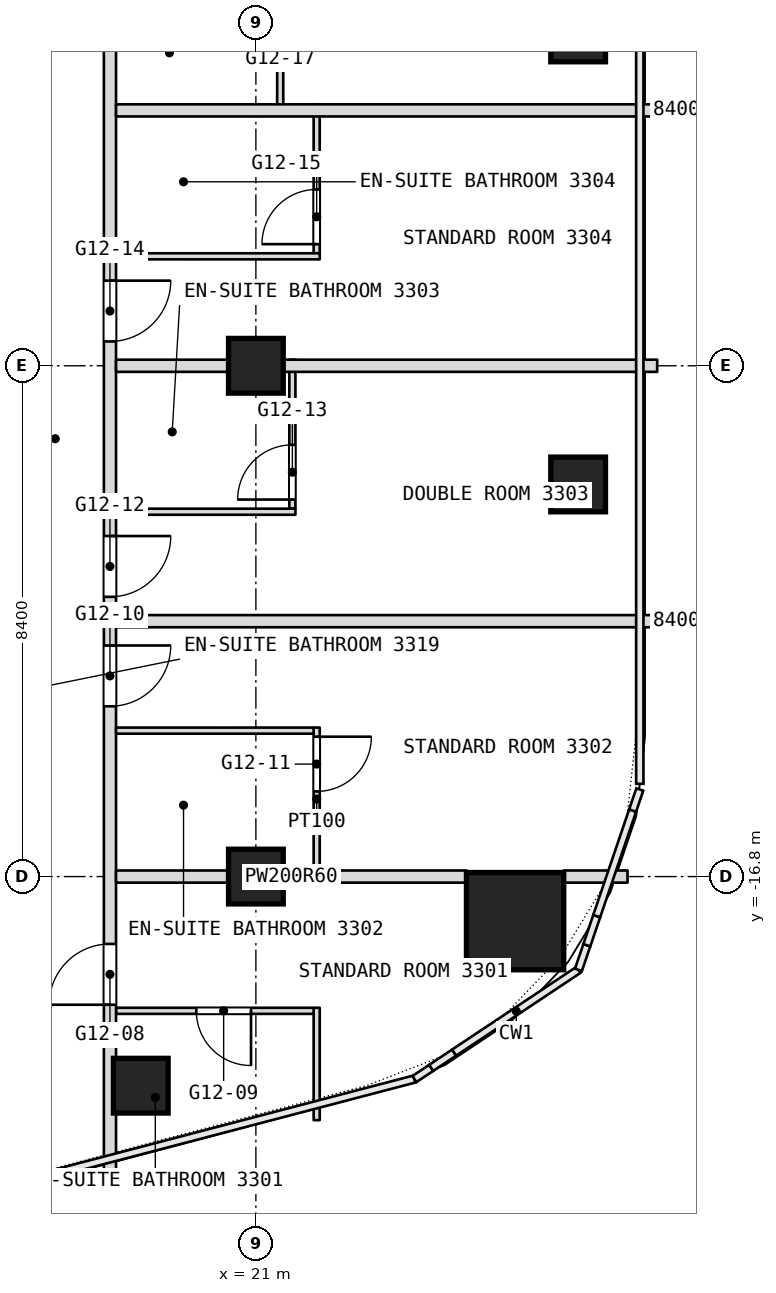
"""IFC4 building model, lengths in metres.
Left out: names, types, materials, properties, quantities, classifications, styles, units other than length and angle.
Written with IfcOpenShell. Run it as: python <this file> out.ifc"""

import sys

from ifc_helpers import new_model, si_unit, direction, frame, frame_2d, origin, origin_2d, place, context, subcontext, project, spatial, rectangle, extrude, element, fill, save


model = new_model("IFC4")
c1 = context("Model", 3, precision=1e-05, world=origin(), true_north=direction((0.0, 1.0)))
c2 = subcontext(c1, "Body", "Model", "MODEL_VIEW")
j1 = project(units=[si_unit("LENGTHUNIT", "METRE"), si_unit("PLANEANGLEUNIT", "RADIAN")], contexts=[c1])
p1 = place(None, origin())
s1 = spatial("IfcSite", under=j1, at=p1, CompositionType="ELEMENT")
p2 = place(p1, origin())
s2 = spatial("IfcBuilding", under=s1, at=p2, CompositionType="ELEMENT")
p3 = place(p2, frame((0.0, 0.0, 144.5)))
s3 = spatial("IfcBuildingStorey", under=s2, at=p3, CompositionType="ELEMENT", Elevation=144.5)
p4 = place(p3, frame((25.263, -17.533, 0.0), z_axis=(0.0, 0.0, 1.0), x_axis=(1.0, 0.0, 0.0)))
e1 = element("IfcColumn", 1, at=p4, inside=s3, PredefinedType="COLUMN", context=c2, shape_type="SweptSolid", body=[
    extrude(rectangle(XDim=1.6, YDim=1.6, at=origin_2d()), origin(), (0.0, 0.0, 1.0), 3.6),
])
for number, where, z_axis, x_axis in (
    (2, (21.0, -16.8, 0.0), (0.0, 0.0, 1.0), (1.0, 0.0, 0.0)),
    (3, (21.0, -8.4, 0.0), (0.0, 0.0, 1.0), (1.0, 0.0, 0.0)),
    (4, (26.3, -2.951, 0.0), (0.0, 0.0, 1.0), (1.0, 0.0, 0.0)),
    (5, (26.3, -10.352, 0.0), (0.0, 0.0, 1.0), (1.0, 0.0, 0.0)),
    (6, (19.107, -20.239, 0.0), (0.0, 0.0, 1.0), (1.0, 0.0, 0.0)),
):
    element("IfcColumn", number, at=place(p3, frame(where, z_axis=z_axis, x_axis=x_axis)), inside=s3, PredefinedType="COLUMN", context=c2, shape_type="SweptSolid", body=[
        extrude(rectangle(XDim=0.9, YDim=0.9, at=origin_2d()), origin(), (0.0, 0.0, 1.0), 3.6),
    ])
p5 = place(p3, frame((22.0, -20.806, 0.0), z_axis=(0.0, 0.0, 1.0), x_axis=(0.0, 1.0, 0.0)))
e7 = element("IfcWall", 7, at=p5, inside=s3, PredefinedType="PARTITIONING", context=c2, shape_type="SweptSolid", body=[
    extrude(rectangle(XDim=1.848, YDim=0.1, at=frame_2d((0.924, 0.0))), origin(), (0.0, 0.0, 1.0), 3.34),
])
p6 = place(p3, frame((22.0, -16.7, 0.0), z_axis=(0.0, 0.0, 1.0), x_axis=(0.0, 1.0, 0.0)))
e8 = element("IfcWall", 8, at=p6, inside=s3, PredefinedType="PARTITIONING", context=c2, shape_type="SweptSolid", body=[
    extrude(rectangle(XDim=2.35, YDim=0.1, at=frame_2d((1.175, 0.0))), origin(), (0.0, 0.0, 1.0), 3.34),
])
p7 = place(p6, frame((1.3, 0.0, 0.0)))
e9 = element("IfcOpeningElement", 9, at=p7, cuts=e8, PredefinedType="OPENING", context=c2, shape_type="SweptSolid", body=[
    extrude(rectangle(XDim=0.9, YDim=2.1, at=frame_2d((0.45, 1.05))), frame((0.0, 0.05, 0.0), z_axis=(0.0, -1.0, 0.0), x_axis=(1.0, 0.0, 0.0)), (0.0, 0.0, 1.0), 0.1),
])
p8 = place(p3, frame((22.0, -6.55, 0.0), z_axis=(0.0, 0.0, 1.0), x_axis=(0.0, 1.0, 0.0)))
e10 = element("IfcWall", 10, at=p8, inside=s3, PredefinedType="PARTITIONING", context=c2, shape_type="SweptSolid", body=[
    extrude(rectangle(XDim=2.45, YDim=0.1, at=frame_2d((1.225, 0.0))), origin(), (0.0, 0.0, 1.0), 3.34),
])
p9 = place(p8, frame((0.15, 0.0, 0.0)))
e11 = element("IfcOpeningElement", 11, at=p9, cuts=e10, PredefinedType="OPENING", context=c2, shape_type="SweptSolid", body=[
    extrude(rectangle(XDim=0.9, YDim=2.1, at=frame_2d((0.45, 1.05))), frame((0.0, 0.05, 0.0), z_axis=(0.0, -1.0, 0.0), x_axis=(1.0, 0.0, 0.0)), (0.0, 0.0, 1.0), 0.1),
])
p10 = place(p3, frame((21.6, -10.75, 0.0), z_axis=(0.0, 0.0, 1.0), x_axis=(0.0, 1.0, 0.0)))
e12 = element("IfcWall", 12, at=p10, inside=s3, PredefinedType="PARTITIONING", context=c2, shape_type="SweptSolid", body=[
    extrude(rectangle(XDim=2.45, YDim=0.1, at=frame_2d((1.225, 0.0))), origin(), (0.0, 0.0, 1.0), 3.34),
])
p11 = place(p10, frame((0.15, 0.0, 0.0)))
e13 = element("IfcOpeningElement", 13, at=p11, cuts=e12, PredefinedType="OPENING", context=c2, shape_type="SweptSolid", body=[
    extrude(rectangle(XDim=0.9, YDim=2.1, at=frame_2d((0.45, 1.05))), frame((0.0, 0.05, 0.0), z_axis=(0.0, -1.0, 0.0), x_axis=(1.0, 0.0, 0.0)), (0.0, 0.0, 1.0), 0.1),
])
p12 = place(p3, frame((21.4, -4.1, 0.0), z_axis=(0.0, 0.0, 1.0), x_axis=(0.0, 1.0, 0.0)))
e14 = element("IfcWall", 14, at=p12, inside=s3, PredefinedType="PARTITIONING", context=c2, shape_type="SweptSolid", body=[
    extrude(rectangle(XDim=2.35, YDim=0.1, at=frame_2d((1.175, 0.0))), origin(), (0.0, 0.0, 1.0), 3.34),
])
p13 = place(p12, frame((1.3, 0.0, 0.0)))
e15 = element("IfcOpeningElement", 15, at=p13, cuts=e14, PredefinedType="OPENING", context=c2, shape_type="SweptSolid", body=[
    extrude(rectangle(XDim=0.9, YDim=2.1, at=frame_2d((0.45, 1.05))), frame((0.0, 0.05, 0.0), z_axis=(0.0, -1.0, 0.0), x_axis=(1.0, 0.0, 0.0)), (0.0, 0.0, 1.0), 0.1),
])
p14 = place(p3, frame((18.7, -19.008, 0.0), z_axis=(0.0, 0.0, 1.0), x_axis=(1.0, 0.0, 0.0)))
e16 = element("IfcWall", 16, at=p14, inside=s3, PredefinedType="PARTITIONING", context=c2, shape_type="SweptSolid", body=[
    extrude(rectangle(XDim=3.25, YDim=0.1, at=frame_2d((1.625, 0.0))), origin(), (0.0, 0.0, 1.0), 3.34),
])
p15 = place(p14, frame((1.32, 0.0, 0.0)))
e17 = element("IfcOpeningElement", 17, at=p15, cuts=e16, PredefinedType="OPENING", context=c2, shape_type="SweptSolid", body=[
    extrude(rectangle(XDim=0.9, YDim=2.1, at=frame_2d((0.45, 1.05))), frame((0.0, 0.05, 0.0), z_axis=(0.0, -1.0, 0.0), x_axis=(1.0, 0.0, 0.0)), (0.0, 0.0, 1.0), 0.1),
])
p16 = place(p3, frame((18.6, -21.708, 0.0), z_axis=(0.0, 0.0, 1.0), x_axis=(0.0, 1.0, 0.0)))
e18 = element("IfcWall", 18, at=p16, inside=s3, PredefinedType="PARTITIONING", context=c2, shape_type="SweptSolid", body=[
    extrude(rectangle(XDim=49.648, YDim=0.2, at=frame_2d((24.824, 0.0))), origin(), (0.0, 0.0, 1.0), 3.34),
])
p17 = place(p16, frame((2.8, 0.0, 0.0)))
e19 = element("IfcOpeningElement", 19, at=p17, cuts=e18, PredefinedType="OPENING", context=c2, shape_type="SweptSolid", body=[
    extrude(rectangle(XDim=1.0, YDim=2.1, at=frame_2d((0.5, 1.05))), frame((0.0, 0.1, 0.0), z_axis=(0.0, -1.0, 0.0), x_axis=(1.0, 0.0, 0.0)), (0.0, 0.0, 1.0), 0.2),
])
p18 = place(p16, frame((7.708, 0.0, 0.0)))
e20 = element("IfcOpeningElement", 20, at=p18, cuts=e18, PredefinedType="OPENING", context=c2, shape_type="SweptSolid", body=[
    extrude(rectangle(XDim=1.0, YDim=2.1, at=frame_2d((0.5, 1.05))), frame((0.0, 0.1, 0.0), z_axis=(0.0, -1.0, 0.0), x_axis=(1.0, 0.0, 0.0)), (0.0, 0.0, 1.0), 0.2),
])
p19 = place(p16, frame((9.508, 0.0, 0.0)))
e21 = element("IfcOpeningElement", 21, at=p19, cuts=e18, PredefinedType="OPENING", context=c2, shape_type="SweptSolid", body=[
    extrude(rectangle(XDim=1.0, YDim=2.1, at=frame_2d((0.5, 1.05))), frame((0.0, 0.1, 0.0), z_axis=(0.0, -1.0, 0.0), x_axis=(1.0, 0.0, 0.0)), (0.0, 0.0, 1.0), 0.2),
])
p20 = place(p16, frame((13.708, 0.0, 0.0)))
e22 = element("IfcOpeningElement", 22, at=p20, cuts=e18, PredefinedType="OPENING", context=c2, shape_type="SweptSolid", body=[
    extrude(rectangle(XDim=1.0, YDim=2.1, at=frame_2d((0.5, 1.05))), frame((0.0, 0.1, 0.0), z_axis=(0.0, -1.0, 0.0), x_axis=(1.0, 0.0, 0.0)), (0.0, 0.0, 1.0), 0.2),
])
p21 = place(p16, frame((20.308, 0.0, 0.0)))
e23 = element("IfcOpeningElement", 23, at=p21, cuts=e18, PredefinedType="OPENING", context=c2, shape_type="SweptSolid", body=[
    extrude(rectangle(XDim=1.0, YDim=2.1, at=frame_2d((0.5, 1.05))), frame((0.0, 0.1, 0.0), z_axis=(0.0, -1.0, 0.0), x_axis=(1.0, 0.0, 0.0)), (0.0, 0.0, 1.0), 0.2),
])
p22 = place(p16, frame((24.508, 0.0, 0.0)))
e24 = element("IfcOpeningElement", 24, at=p22, cuts=e18, PredefinedType="OPENING", context=c2, shape_type="SweptSolid", body=[
    extrude(rectangle(XDim=1.0, YDim=2.1, at=frame_2d((0.5, 1.05))), frame((0.0, 0.1, 0.0), z_axis=(0.0, -1.0, 0.0), x_axis=(1.0, 0.0, 0.0)), (0.0, 0.0, 1.0), 0.2),
])
p23 = place(p16, frame((26.308, 0.0, 0.0)))
e25 = element("IfcOpeningElement", 25, at=p23, cuts=e18, PredefinedType="OPENING", context=c2, shape_type="SweptSolid", body=[
    extrude(rectangle(XDim=1.0, YDim=2.1, at=frame_2d((0.5, 1.05))), frame((0.0, 0.1, 0.0), z_axis=(0.0, -1.0, 0.0), x_axis=(1.0, 0.0, 0.0)), (0.0, 0.0, 1.0), 0.2),
])
p24 = place(p16, frame((30.508, 0.0, 0.0)))
e26 = element("IfcOpeningElement", 26, at=p24, cuts=e18, PredefinedType="OPENING", context=c2, shape_type="SweptSolid", body=[
    extrude(rectangle(XDim=1.0, YDim=2.1, at=frame_2d((0.5, 1.05))), frame((0.0, 0.1, 0.0), z_axis=(0.0, -1.0, 0.0), x_axis=(1.0, 0.0, 0.0)), (0.0, 0.0, 1.0), 0.2),
])
p25 = place(p16, frame((37.108, 0.0, 0.0)))
e27 = element("IfcOpeningElement", 27, at=p25, cuts=e18, PredefinedType="OPENING", context=c2, shape_type="SweptSolid", body=[
    extrude(rectangle(XDim=1.0, YDim=2.1, at=frame_2d((0.5, 1.05))), frame((0.0, 0.1, 0.0), z_axis=(0.0, -1.0, 0.0), x_axis=(1.0, 0.0, 0.0)), (0.0, 0.0, 1.0), 0.2),
])
p26 = place(p16, frame((43.558, 0.0, 0.0)))
e28 = element("IfcOpeningElement", 28, at=p26, cuts=e18, PredefinedType="OPENING", context=c2, shape_type="SweptSolid", body=[
    extrude(rectangle(XDim=1.1, YDim=2.1, at=frame_2d((0.55, 1.05))), frame((0.0, 0.1, 0.0), z_axis=(0.0, -1.0, 0.0), x_axis=(1.0, 0.0, 0.0)), (0.0, 0.0, 1.0), 0.2),
])
p27 = place(p3, frame((18.7, -16.8, 0.0), z_axis=(0.0, 0.0, 1.0), x_axis=(1.0, 0.0, 0.0)))
e29 = element("IfcWall", 29, at=p27, inside=s3, PredefinedType="PARTITIONING", context=c2, shape_type="SweptSolid", body=[
    extrude(rectangle(XDim=5.763, YDim=0.2, at=frame_2d((2.881, 0.0))), origin(), (0.0, 0.0, 1.0), 2.89),
])
p28 = place(p3, frame((26.063, -16.8, 0.0), z_axis=(0.0, 0.0, 1.0), x_axis=(1.0, 0.0, 0.0)))
e30 = element("IfcWall", 30, at=p28, inside=s3, PredefinedType="PARTITIONING", context=c2, shape_type="SweptSolid", body=[
    extrude(rectangle(XDim=1.049, YDim=0.2, at=frame_2d((0.524, 0.0))), origin(), (0.0, 0.0, 1.0), 3.34),
])
p29 = place(p3, frame((18.7, -14.4, 0.0), z_axis=(0.0, 0.0, 1.0), x_axis=(1.0, 0.0, 0.0)))
e31 = element("IfcWall", 31, at=p29, inside=s3, PredefinedType="PARTITIONING", context=c2, shape_type="SweptSolid", body=[
    extrude(rectangle(XDim=3.25, YDim=0.1, at=frame_2d((1.625, 0.0))), origin(), (0.0, 0.0, 1.0), 3.34),
])
p30 = place(p3, frame((18.7, -12.6, 0.0), z_axis=(0.0, 0.0, 1.0), x_axis=(1.0, 0.0, 0.0)))
e32 = element("IfcWall", 32, at=p30, inside=s3, PredefinedType="PARTITIONING", context=c2, shape_type="SweptSolid", body=[
    extrude(rectangle(XDim=8.9, YDim=0.2, at=frame_2d((4.45, 0.0))), origin(), (0.0, 0.0, 1.0), 3.34),
])
p31 = place(p3, frame((18.7, -10.8, 0.0), z_axis=(0.0, 0.0, 1.0), x_axis=(1.0, 0.0, 0.0)))
e33 = element("IfcWall", 33, at=p31, inside=s3, PredefinedType="PARTITIONING", context=c2, shape_type="SweptSolid", body=[
    extrude(rectangle(XDim=2.95, YDim=0.1, at=frame_2d((1.475, 0.0))), origin(), (0.0, 0.0, 1.0), 3.34),
])
p32 = place(p3, frame((18.7, -8.4, 0.0), z_axis=(0.0, 0.0, 1.0), x_axis=(1.0, 0.0, 0.0)))
e34 = element("IfcWall", 34, at=p32, inside=s3, PredefinedType="PARTITIONING", context=c2, shape_type="SweptSolid", body=[
    extrude(rectangle(XDim=8.9, YDim=0.2, at=frame_2d((4.45, 0.0))), origin(), (0.0, 0.0, 1.0), 2.89),
])
p33 = place(p3, frame((18.7, -6.6, 0.0), z_axis=(0.0, 0.0, 1.0), x_axis=(1.0, 0.0, 0.0)))
e35 = element("IfcWall", 35, at=p33, inside=s3, PredefinedType="PARTITIONING", context=c2, shape_type="SweptSolid", body=[
    extrude(rectangle(XDim=3.35, YDim=0.1, at=frame_2d((1.675, 0.0))), origin(), (0.0, 0.0, 1.0), 3.34),
])
p34 = place(p3, frame((18.7, -4.2, 0.0), z_axis=(0.0, 0.0, 1.0), x_axis=(1.0, 0.0, 0.0)))
e36 = element("IfcWall", 36, at=p34, inside=s3, PredefinedType="PARTITIONING", context=c2, shape_type="SweptSolid", body=[
    extrude(rectangle(XDim=8.9, YDim=0.2, at=frame_2d((4.45, 0.0))), origin(), (0.0, 0.0, 1.0), 3.34),
])
p35 = place(p7, origin())
e37 = element("IfcDoor", 37, at=p35, inside=s3, OperationType="SINGLE_SWING_RIGHT", PredefinedType="DOOR", context=c2, shape_type="SweptSolid", body=[
    extrude(rectangle(XDim=0.9, YDim=2.1, at=frame_2d((0.45, 1.05))), frame((0.0, 0.025, 0.0), z_axis=(0.0, -1.0, 0.0), x_axis=(1.0, 0.0, 0.0)), (0.0, 0.0, 1.0), 0.05),
])
fill(e9, e37)
p36 = place(p9, origin())
e38 = element("IfcDoor", 38, at=p36, inside=s3, OperationType="SINGLE_SWING_LEFT", PredefinedType="DOOR", context=c2, shape_type="SweptSolid", body=[
    extrude(rectangle(XDim=0.9, YDim=2.1, at=frame_2d((0.45, 1.05))), frame((0.0, 0.025, 0.0), z_axis=(0.0, -1.0, 0.0), x_axis=(1.0, 0.0, 0.0)), (0.0, 0.0, 1.0), 0.05),
])
fill(e11, e38)
p37 = place(p11, origin())
e39 = element("IfcDoor", 39, at=p37, inside=s3, OperationType="SINGLE_SWING_LEFT", PredefinedType="DOOR", context=c2, shape_type="SweptSolid", body=[
    extrude(rectangle(XDim=0.9, YDim=2.1, at=frame_2d((0.45, 1.05))), frame((0.0, 0.025, 0.0), z_axis=(0.0, -1.0, 0.0), x_axis=(1.0, 0.0, 0.0)), (0.0, 0.0, 1.0), 0.05),
])
fill(e13, e39)
p38 = place(p15, origin())
e40 = element("IfcDoor", 40, at=p38, inside=s3, OperationType="SINGLE_SWING_RIGHT", PredefinedType="DOOR", context=c2, shape_type="SweptSolid", body=[
    extrude(rectangle(XDim=0.9, YDim=2.1, at=frame_2d((0.45, 1.05))), frame((0.0, 0.025, 0.0), z_axis=(0.0, -1.0, 0.0), x_axis=(1.0, 0.0, 0.0)), (0.0, 0.0, 1.0), 0.05),
])
fill(e17, e40)
p39 = place(p17, origin())
e41 = element("IfcDoor", 41, at=p39, inside=s3, OperationType="SINGLE_SWING_RIGHT", PredefinedType="DOOR", context=c2, shape_type="SweptSolid", body=[
    extrude(rectangle(XDim=1.0, YDim=2.1, at=frame_2d((0.5, 1.05))), frame((0.0, 0.025, 0.0), z_axis=(0.0, -1.0, 0.0), x_axis=(1.0, 0.0, 0.0)), (0.0, 0.0, 1.0), 0.05),
])
fill(e19, e41)
p40 = place(p18, origin())
e42 = element("IfcDoor", 42, at=p40, inside=s3, OperationType="SINGLE_SWING_RIGHT", PredefinedType="DOOR", context=c2, shape_type="SweptSolid", body=[
    extrude(rectangle(XDim=1.0, YDim=2.1, at=frame_2d((0.5, 1.05))), frame((0.0, 0.025, 0.0), z_axis=(0.0, -1.0, 0.0), x_axis=(1.0, 0.0, 0.0)), (0.0, 0.0, 1.0), 0.05),
])
fill(e20, e42)
p41 = place(p19, origin())
e43 = element("IfcDoor", 43, at=p41, inside=s3, OperationType="SINGLE_SWING_RIGHT", PredefinedType="DOOR", context=c2, shape_type="SweptSolid", body=[
    extrude(rectangle(XDim=1.0, YDim=2.1, at=frame_2d((0.5, 1.05))), frame((0.0, 0.025, 0.0), z_axis=(0.0, -1.0, 0.0), x_axis=(1.0, 0.0, 0.0)), (0.0, 0.0, 1.0), 0.05),
])
fill(e21, e43)
p42 = place(p20, origin())
e44 = element("IfcDoor", 44, at=p42, inside=s3, OperationType="SINGLE_SWING_RIGHT", PredefinedType="DOOR", context=c2, shape_type="SweptSolid", body=[
    extrude(rectangle(XDim=1.0, YDim=2.1, at=frame_2d((0.5, 1.05))), frame((0.0, 0.025, 0.0), z_axis=(0.0, -1.0, 0.0), x_axis=(1.0, 0.0, 0.0)), (0.0, 0.0, 1.0), 0.05),
])
fill(e22, e44)
save(model, sys.argv[1])
